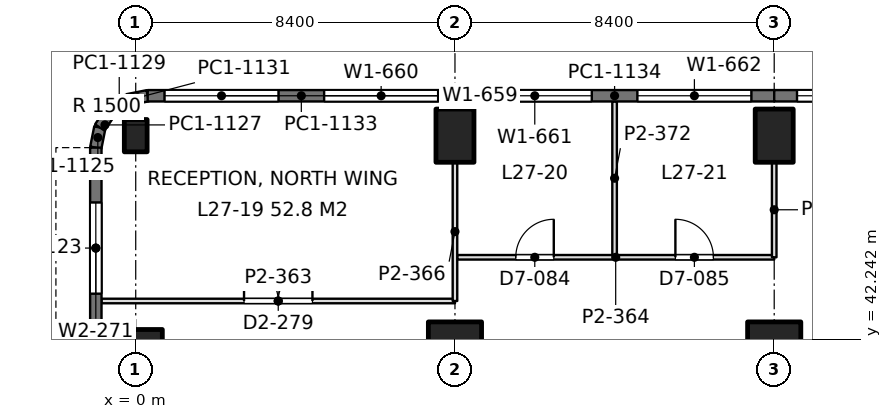
"""IFC4 building model, lengths in metres.
Left out: names, types, materials, properties, quantities, classifications, styles, units other than length and angle.
Written with IfcOpenShell. Run it as: python <this file> out.ifc"""

import sys

from ifc_helpers import new_model, si_unit, direction, frame, frame_2d, origin, origin_2d, place, context, subcontext, project, spatial, rectangle, extrude, element, fill, save


model = new_model("IFC4")
c1 = context("Model", 3, precision=1e-05, world=origin(), true_north=direction((0.0, 1.0)))
c2 = subcontext(c1, "Body", "Model", "MODEL_VIEW")
j1 = project(units=[si_unit("LENGTHUNIT", "METRE"), si_unit("PLANEANGLEUNIT", "RADIAN")], contexts=[c1])
p1 = place(None, origin())
s1 = spatial("IfcSite", under=j1, at=p1, CompositionType="ELEMENT")
p2 = place(p1, origin())
s2 = spatial("IfcBuilding", under=s1, at=p2, CompositionType="ELEMENT")
p3 = place(p2, frame((0.0, 0.0, 121.8)))
s3 = spatial("IfcBuildingStorey", under=s2, at=p3, CompositionType="ELEMENT", Elevation=121.8)
p4 = place(p3, frame((0.0, 42.0, 0.0), z_axis=(0.0, 0.0, 1.0), x_axis=(0.0, 1.0, 0.0)))
e1 = element("IfcColumn", 1, at=p4, inside=s3, PredefinedType="COLUMN", context=c2, shape_type="SweptSolid", body=[
    extrude(rectangle(XDim=1.0, YDim=1.4, at=origin_2d()), origin(), (0.0, 0.0, 1.0), 4.2),
])
p5 = place(p3, frame((0.0, 47.6, 0.0), z_axis=(0.0, 0.0, 1.0), x_axis=(1.0, 0.0, 0.0)))
e2 = element("IfcColumn", 2, at=p5, inside=s3, PredefinedType="COLUMN", context=c2, shape_type="SweptSolid", body=[
    extrude(rectangle(XDim=0.6, YDim=0.85, at=origin_2d()), origin(), (0.0, 0.0, 1.0), 4.2),
])
p6 = place(p3, frame((8.4, 42.0, 0.0), z_axis=(0.0, 0.0, 1.0), x_axis=(1.0, 0.0, 0.0)))
e3 = element("IfcColumn", 3, at=p6, inside=s3, PredefinedType="COLUMN", context=c2, shape_type="SweptSolid", body=[
    extrude(rectangle(XDim=1.4, YDim=1.4, at=origin_2d()), origin(), (0.0, 0.0, 1.0), 4.2),
])
p7 = place(p3, frame((8.4, 47.6, 0.0), z_axis=(0.0, 0.0, 1.0), x_axis=(1.0, 0.0, 0.0)))
e4 = element("IfcColumn", 4, at=p7, inside=s3, PredefinedType="COLUMN", context=c2, shape_type="SweptSolid", body=[
    extrude(rectangle(XDim=1.0, YDim=1.4, at=origin_2d()), origin(), (0.0, 0.0, 1.0), 4.2),
])
p8 = place(p3, frame((16.8, 42.0, 0.0), z_axis=(0.0, 0.0, 1.0), x_axis=(1.0, 0.0, 0.0)))
e5 = element("IfcColumn", 5, at=p8, inside=s3, PredefinedType="COLUMN", context=c2, shape_type="SweptSolid", body=[
    extrude(rectangle(XDim=1.4, YDim=1.4, at=origin_2d()), origin(), (0.0, 0.0, 1.0), 4.2),
])
p9 = place(p3, frame((16.8, 47.6, 0.0), z_axis=(0.0, 0.0, 1.0), x_axis=(1.0, 0.0, 0.0)))
e6 = element("IfcColumn", 6, at=p9, inside=s3, PredefinedType="COLUMN", context=c2, shape_type="SweptSolid", body=[
    extrude(rectangle(XDim=1.0, YDim=1.4, at=origin_2d()), origin(), (0.0, 0.0, 1.0), 4.2),
])
p10 = place(p3, frame((-1.05, 42.0, 0.0), z_axis=(0.0, 0.0, 1.0), x_axis=(0.0, 1.0, 0.0)))
e7 = element("IfcWall", 7, at=p10, inside=s3, PredefinedType="SOLIDWALL", context=c2, shape_type="SweptSolid", body=[
    extrude(rectangle(XDim=5.285, YDim=0.3, at=frame_2d((2.643, 0.0))), origin(), (0.0, 0.0, 1.0), 4.05),
])
p11 = place(p10, frame((1.443, 0.0, 0.9)))
e8 = element("IfcOpeningElement", 8, at=p11, cuts=e7, PredefinedType="OPENING", context=c2, shape_type="SweptSolid", body=[
    extrude(rectangle(XDim=2.4, YDim=1.9, at=frame_2d((1.2, 0.95))), frame((0.0, 0.16, 0.0), z_axis=(0.0, -1.0, 0.0), x_axis=(1.0, 0.0, 0.0)), (0.0, 0.0, 1.0), 0.32),
])
p12 = place(p3, frame((-1.05, 47.285, 0.0), z_axis=(0.0, 0.0, 1.0), x_axis=(0.195073962632, 0.980788534345, 0.0)))
e9 = element("IfcWall", 9, at=p12, inside=s3, PredefinedType="SOLIDWALL", context=c2, shape_type="SweptSolid", body=[
    extrude(rectangle(XDim=0.541, YDim=0.3, at=frame_2d((0.271, 0.0))), origin(), (0.0, 0.0, 1.0), 4.05),
])
p13 = place(p3, frame((-0.945, 47.815, 0.0), z_axis=(0.0, 0.0, 1.0), x_axis=(0.55534295404, 0.831621430339, 0.0)))
e10 = element("IfcWall", 10, at=p13, inside=s3, PredefinedType="SOLIDWALL", context=c2, shape_type="SweptSolid", body=[
    extrude(rectangle(XDim=0.526, YDim=0.3, at=frame_2d((0.263, 0.0))), origin(), (0.0, 0.0, 1.0), 4.05),
])
p14 = place(p3, frame((-0.653, 48.253, 0.0), z_axis=(0.0, 0.0, 1.0), x_axis=(0.831692711774, 0.555236195849, 0.0)))
e11 = element("IfcWall", 11, at=p14, inside=s3, PredefinedType="SOLIDWALL", context=c2, shape_type="SweptSolid", body=[
    extrude(rectangle(XDim=0.525, YDim=0.3, at=frame_2d((0.263, 0.0))), origin(), (0.0, 0.0, 1.0), 4.05),
])
p15 = place(p3, frame((-0.216, 48.544, 0.0), z_axis=(0.0, 0.0, 1.0), x_axis=(0.980788534345, 0.195073962632, 0.0)))
e12 = element("IfcWall", 12, at=p15, inside=s3, PredefinedType="SOLIDWALL", context=c2, shape_type="SweptSolid", body=[
    extrude(rectangle(XDim=0.541, YDim=0.3, at=frame_2d((0.271, 0.0))), origin(), (0.0, 0.0, 1.0), 4.05),
])
p16 = place(p3, frame((0.315, 48.65, 0.0), z_axis=(0.0, 0.0, 1.0), x_axis=(1.0, 0.0, 0.0)))
e13 = element("IfcWall", 13, at=p16, inside=s3, PredefinedType="SOLIDWALL", context=c2, shape_type="SweptSolid", body=[
    extrude(rectangle(XDim=8.085, YDim=0.3, at=frame_2d((4.042, 0.0))), origin(), (0.0, 0.0, 1.0), 4.05),
])
p17 = place(p16, frame((0.443, 0.0, 0.9)))
e14 = element("IfcOpeningElement", 14, at=p17, cuts=e13, PredefinedType="OPENING", context=c2, shape_type="SweptSolid", body=[
    extrude(rectangle(XDim=3.0, YDim=1.9, at=frame_2d((1.5, 0.95))), frame((0.0, 0.16, 0.0), z_axis=(0.0, -1.0, 0.0), x_axis=(1.0, 0.0, 0.0)), (0.0, 0.0, 1.0), 0.32),
])
p18 = place(p16, frame((4.643, 0.0, 0.9)))
e15 = element("IfcOpeningElement", 15, at=p18, cuts=e13, PredefinedType="OPENING", context=c2, shape_type="SweptSolid", body=[
    extrude(rectangle(XDim=3.0, YDim=1.9, at=frame_2d((1.5, 0.95))), frame((0.0, 0.16, 0.0), z_axis=(0.0, -1.0, 0.0), x_axis=(1.0, 0.0, 0.0)), (0.0, 0.0, 1.0), 0.32),
])
p19 = place(p3, frame((8.4, 48.65, 0.0), z_axis=(0.0, 0.0, 1.0), x_axis=(1.0, 0.0, 0.0)))
e16 = element("IfcWall", 16, at=p19, inside=s3, PredefinedType="SOLIDWALL", context=c2, shape_type="SweptSolid", body=[
    extrude(rectangle(XDim=8.4, YDim=0.3, at=frame_2d((4.2, 0.0))), origin(), (0.0, 0.0, 1.0), 4.05),
])
p20 = place(p19, frame((0.6, 0.0, 0.9)))
e17 = element("IfcOpeningElement", 17, at=p20, cuts=e16, PredefinedType="OPENING", context=c2, shape_type="SweptSolid", body=[
    extrude(rectangle(XDim=3.0, YDim=1.9, at=frame_2d((1.5, 0.95))), frame((0.0, 0.16, 0.0), z_axis=(0.0, -1.0, 0.0), x_axis=(1.0, 0.0, 0.0)), (0.0, 0.0, 1.0), 0.32),
])
p21 = place(p19, frame((4.8, 0.0, 0.9)))
e18 = element("IfcOpeningElement", 18, at=p21, cuts=e16, PredefinedType="OPENING", context=c2, shape_type="SweptSolid", body=[
    extrude(rectangle(XDim=3.0, YDim=1.9, at=frame_2d((1.5, 0.95))), frame((0.0, 0.16, 0.0), z_axis=(0.0, -1.0, 0.0), x_axis=(1.0, 0.0, 0.0)), (0.0, 0.0, 1.0), 0.32),
])
p22 = place(p3, frame((16.8, 48.65, 0.0), z_axis=(0.0, 0.0, 1.0), x_axis=(1.0, 0.0, 0.0)))
e19 = element("IfcWall", 19, at=p22, inside=s3, PredefinedType="SOLIDWALL", context=c2, shape_type="SweptSolid", body=[
    extrude(rectangle(XDim=8.4, YDim=0.3, at=frame_2d((4.2, 0.0))), origin(), (0.0, 0.0, 1.0), 4.05),
])
p23 = place(p22, frame((0.6, 0.0, 0.9)))
e20 = element("IfcOpeningElement", 20, at=p23, cuts=e19, PredefinedType="OPENING", context=c2, shape_type="SweptSolid", body=[
    extrude(rectangle(XDim=3.0, YDim=1.9, at=frame_2d((1.5, 0.95))), frame((0.0, 0.16, 0.0), z_axis=(0.0, -1.0, 0.0), x_axis=(1.0, 0.0, 0.0)), (0.0, 0.0, 1.0), 0.32),
])
p24 = place(p22, frame((4.8, 0.0, 0.9)))
e21 = element("IfcOpeningElement", 21, at=p24, cuts=e19, PredefinedType="OPENING", context=c2, shape_type="SweptSolid", body=[
    extrude(rectangle(XDim=3.0, YDim=1.9, at=frame_2d((1.5, 0.95))), frame((0.0, 0.16, 0.0), z_axis=(0.0, -1.0, 0.0), x_axis=(1.0, 0.0, 0.0)), (0.0, 0.0, 1.0), 0.32),
])
p25 = place(p3, frame((-0.902, 43.25, 0.0), z_axis=(0.0, 0.0, 1.0), x_axis=(1.0, 0.0, 0.0)))
e22 = element("IfcWall", 22, at=p25, inside=s3, PredefinedType="PARTITIONING", context=c2, shape_type="SweptSolid", body=[
    extrude(rectangle(XDim=9.302, YDim=0.12, at=frame_2d((4.651, 0.0))), origin(), (0.0, 0.0, 1.0), 3.55),
])
p26 = place(p25, frame((3.752, 0.0, 0.0)))
e23 = element("IfcOpeningElement", 23, at=p26, cuts=e22, PredefinedType="OPENING", context=c2, shape_type="SweptSolid", body=[
    extrude(rectangle(XDim=1.8, YDim=2.2, at=frame_2d((0.9, 1.1))), frame((0.0, 0.07, 0.0), z_axis=(0.0, -1.0, 0.0), x_axis=(1.0, 0.0, 0.0)), (0.0, 0.0, 1.0), 0.14),
])
p27 = place(p3, frame((8.458, 44.4, 0.0), z_axis=(0.0, 0.0, 1.0), x_axis=(1.0, 0.0, 0.0)))
e24 = element("IfcWall", 24, at=p27, inside=s3, PredefinedType="PARTITIONING", context=c2, shape_type="SweptSolid", body=[
    extrude(rectangle(XDim=8.342, YDim=0.12, at=frame_2d((4.171, 0.0))), origin(), (0.0, 0.0, 1.0), 3.55),
])
p28 = place(p27, frame((1.542, 0.0, 0.0)))
e25 = element("IfcOpeningElement", 25, at=p28, cuts=e24, PredefinedType="OPENING", context=c2, shape_type="SweptSolid", body=[
    extrude(rectangle(XDim=1.0, YDim=2.4, at=frame_2d((0.5, 1.2))), frame((0.0, 0.07, 0.0), z_axis=(0.0, -1.0, 0.0), x_axis=(1.0, 0.0, 0.0)), (0.0, 0.0, 1.0), 0.14),
])
p29 = place(p27, frame((5.742, 0.0, 0.0)))
e26 = element("IfcOpeningElement", 26, at=p29, cuts=e24, PredefinedType="OPENING", context=c2, shape_type="SweptSolid", body=[
    extrude(rectangle(XDim=1.0, YDim=2.4, at=frame_2d((0.5, 1.2))), frame((0.0, 0.07, 0.0), z_axis=(0.0, -1.0, 0.0), x_axis=(1.0, 0.0, 0.0)), (0.0, 0.0, 1.0), 0.14),
])
p30 = place(p3, frame((8.4, 43.25, 0.0), z_axis=(0.0, 0.0, 1.0), x_axis=(0.0, 1.0, 0.0)))
e27 = element("IfcWall", 27, at=p30, inside=s3, PredefinedType="PARTITIONING", context=c2, shape_type="SweptSolid", body=[
    extrude(rectangle(XDim=3.651, YDim=0.12, at=frame_2d((1.825, 0.0))), origin(), (0.0, 0.0, 1.0), 3.55),
])
p31 = place(p3, frame((12.6, 44.458, 0.0), z_axis=(0.0, 0.0, 1.0), x_axis=(0.0, 1.0, 0.0)))
e28 = element("IfcWall", 28, at=p31, inside=s3, PredefinedType="PARTITIONING", context=c2, shape_type="SweptSolid", body=[
    extrude(rectangle(XDim=4.044, YDim=0.12, at=frame_2d((2.022, 0.0))), origin(), (0.0, 0.0, 1.0), 3.56),
])
p32 = place(p3, frame((16.8, 44.4, 0.0), z_axis=(0.0, 0.0, 1.0), x_axis=(0.0, 1.0, 0.0)))
e29 = element("IfcWall", 29, at=p32, inside=s3, PredefinedType="PARTITIONING", context=c2, shape_type="SweptSolid", body=[
    extrude(rectangle(XDim=2.501, YDim=0.12, at=frame_2d((1.25, 0.0))), origin(), (0.0, 0.0, 1.0), 3.55),
])
p33 = place(p11, origin())
e30 = element("IfcWindow", 30, at=p33, inside=s3, PartitioningType="SINGLE_PANEL", PredefinedType="WINDOW", context=c2, shape_type="SweptSolid", body=[
    extrude(rectangle(XDim=2.4, YDim=1.9, at=frame_2d((1.2, 0.95))), frame((0.0, 0.03, 0.0), z_axis=(0.0, -1.0, 0.0), x_axis=(1.0, 0.0, 0.0)), (0.0, 0.0, 1.0), 0.06),
])
fill(e8, e30)
p34 = place(p17, origin())
e31 = element("IfcWindow", 31, at=p34, inside=s3, PartitioningType="SINGLE_PANEL", PredefinedType="WINDOW", context=c2, shape_type="SweptSolid", body=[
    extrude(rectangle(XDim=3.0, YDim=1.9, at=frame_2d((1.5, 0.95))), frame((0.0, 0.03, 0.0), z_axis=(0.0, -1.0, 0.0), x_axis=(1.0, 0.0, 0.0)), (0.0, 0.0, 1.0), 0.06),
])
fill(e14, e31)
p35 = place(p18, origin())
e32 = element("IfcWindow", 32, at=p35, inside=s3, PartitioningType="SINGLE_PANEL", PredefinedType="WINDOW", context=c2, shape_type="SweptSolid", body=[
    extrude(rectangle(XDim=3.0, YDim=1.9, at=frame_2d((1.5, 0.95))), frame((0.0, 0.03, 0.0), z_axis=(0.0, -1.0, 0.0), x_axis=(1.0, 0.0, 0.0)), (0.0, 0.0, 1.0), 0.06),
])
fill(e15, e32)
p36 = place(p20, origin())
e33 = element("IfcWindow", 33, at=p36, inside=s3, PartitioningType="SINGLE_PANEL", PredefinedType="WINDOW", context=c2, shape_type="SweptSolid", body=[
    extrude(rectangle(XDim=3.0, YDim=1.9, at=frame_2d((1.5, 0.95))), frame((0.0, 0.03, 0.0), z_axis=(0.0, -1.0, 0.0), x_axis=(1.0, 0.0, 0.0)), (0.0, 0.0, 1.0), 0.06),
])
fill(e17, e33)
p37 = place(p21, origin())
e34 = element("IfcWindow", 34, at=p37, inside=s3, PartitioningType="SINGLE_PANEL", PredefinedType="WINDOW", context=c2, shape_type="SweptSolid", body=[
    extrude(rectangle(XDim=3.0, YDim=1.9, at=frame_2d((1.5, 0.95))), frame((0.0, 0.03, 0.0), z_axis=(0.0, -1.0, 0.0), x_axis=(1.0, 0.0, 0.0)), (0.0, 0.0, 1.0), 0.06),
])
fill(e18, e34)
p38 = place(p23, origin())
e35 = element("IfcWindow", 35, at=p38, inside=s3, PartitioningType="SINGLE_PANEL", PredefinedType="WINDOW", context=c2, shape_type="SweptSolid", body=[
    extrude(rectangle(XDim=3.0, YDim=1.9, at=frame_2d((1.5, 0.95))), frame((0.0, 0.03, 0.0), z_axis=(0.0, -1.0, 0.0), x_axis=(1.0, 0.0, 0.0)), (0.0, 0.0, 1.0), 0.06),
])
fill(e20, e35)
p39 = place(p26, origin())
e36 = element("IfcDoor", 36, at=p39, inside=s3, OperationType="DOUBLE_DOOR_SINGLE_SWING", PredefinedType="DOOR", context=c2, shape_type="SweptSolid", body=[
    extrude(rectangle(XDim=1.8, YDim=2.2, at=frame_2d((0.9, 1.1))), frame((0.0, 0.025, 0.0), z_axis=(0.0, -1.0, 0.0), x_axis=(1.0, 0.0, 0.0)), (0.0, 0.0, 1.0), 0.05),
])
fill(e23, e36)
p40 = place(p28, origin())
e37 = element("IfcDoor", 37, at=p40, inside=s3, OperationType="SINGLE_SWING_RIGHT", PredefinedType="DOOR", context=c2, shape_type="SweptSolid", body=[
    extrude(rectangle(XDim=1.0, YDim=2.4, at=frame_2d((0.5, 1.2))), frame((0.0, 0.025, 0.0), z_axis=(0.0, -1.0, 0.0), x_axis=(1.0, 0.0, 0.0)), (0.0, 0.0, 1.0), 0.05),
])
fill(e25, e37)
p41 = place(p29, origin())
e38 = element("IfcDoor", 38, at=p41, inside=s3, OperationType="SINGLE_SWING_LEFT", PredefinedType="DOOR", context=c2, shape_type="SweptSolid", body=[
    extrude(rectangle(XDim=1.0, YDim=2.4, at=frame_2d((0.5, 1.2))), frame((0.0, 0.025, 0.0), z_axis=(0.0, -1.0, 0.0), x_axis=(1.0, 0.0, 0.0)), (0.0, 0.0, 1.0), 0.05),
])
fill(e26, e38)
save(model, sys.argv[1])
